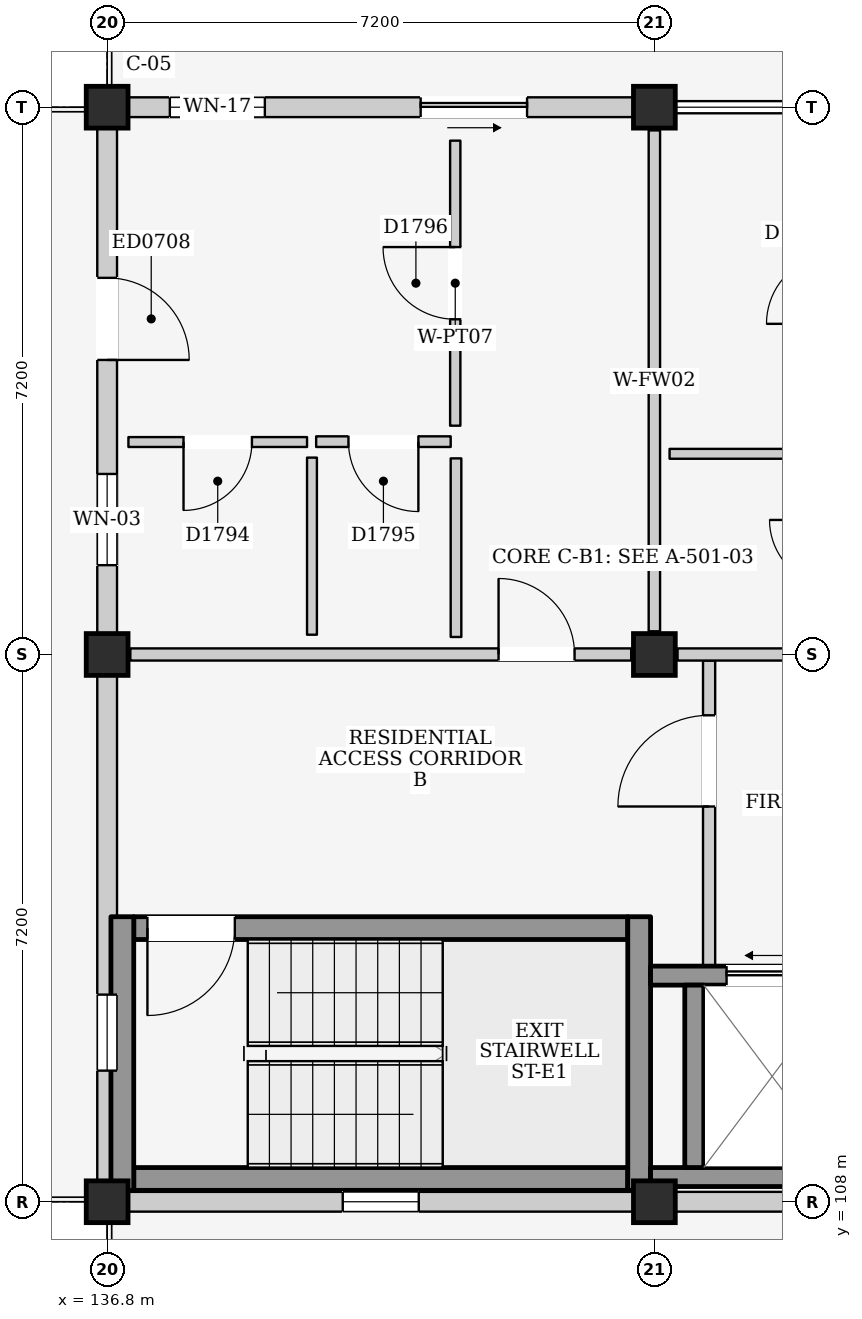
"""IFC4 building model, lengths in metres.
Left out: names, types, materials, properties, quantities, classifications, styles, units other than length and angle.
Written with IfcOpenShell. Run it as: python <this file> out.ifc"""

import sys

from ifc_helpers import new_model, si_unit, direction, frame, frame_2d, origin, origin_2d, place, context, subcontext, project, spatial, rectangle, extrude, element, fill, save


model = new_model("IFC4")
c1 = context("Model", 3, precision=1e-05, world=origin(), true_north=direction((0.0, 1.0)))
c2 = subcontext(c1, "Body", "Model", "MODEL_VIEW")
j1 = project(units=[si_unit("LENGTHUNIT", "METRE"), si_unit("PLANEANGLEUNIT", "RADIAN")], contexts=[c1])
p1 = place(None, origin())
s1 = spatial("IfcSite", under=j1, at=p1, CompositionType="ELEMENT")
p2 = place(p1, origin())
s2 = spatial("IfcBuilding", under=s1, at=p2, CompositionType="ELEMENT")
p3 = place(p2, frame((0.0, 0.0, 31.5)))
s3 = spatial("IfcBuildingStorey", under=s2, at=p3, CompositionType="ELEMENT", Elevation=31.5)
for number, where, z_axis, x_axis in (
    (1, (136.8, 108.0, 0.0), (0.0, 0.0, 1.0), (1.0, 0.0, 0.0)),
    (2, (136.8, 115.2, 0.0), (0.0, 0.0, 1.0), (1.0, 0.0, 0.0)),
    (3, (136.8, 122.4, 0.0), (0.0, 0.0, 1.0), (1.0, 0.0, 0.0)),
    (4, (144.0, 108.0, 0.0), (0.0, 0.0, 1.0), (1.0, 0.0, 0.0)),
    (5, (144.0, 115.2, 0.0), (0.0, 0.0, 1.0), (1.0, 0.0, 0.0)),
    (6, (144.0, 122.4, 0.0), (0.0, 0.0, 1.0), (1.0, 0.0, 0.0)),
):
    element("IfcColumn", number, at=place(p3, frame(where, z_axis=z_axis, x_axis=x_axis)), inside=s3, PredefinedType="COLUMN", context=c2, shape_type="SweptSolid", body=[
        extrude(rectangle(XDim=0.55, YDim=0.55, at=origin_2d()), origin(), (0.0, 0.0, 1.0), 3.3),
    ])
p4 = place(p3, frame((137.075, 108.0, 0.0), z_axis=(0.0, 0.0, 1.0), x_axis=(1.0, 0.0, 0.0)))
e7 = element("IfcWall", 7, at=p4, inside=s3, PredefinedType="ELEMENTEDWALL", context=c2, shape_type="SweptSolid", body=[
    extrude(rectangle(XDim=6.65, YDim=0.26, at=frame_2d((3.325, 0.0))), origin(), (0.0, 0.0, 1.0), 2.465),
])
p5 = place(p4, frame((2.825, 0.0, 1.2)))
e8 = element("IfcOpeningElement", 8, at=p5, cuts=e7, PredefinedType="OPENING", context=c2, shape_type="SweptSolid", body=[
    extrude(rectangle(XDim=1.0, YDim=0.9, at=frame_2d((0.5, 0.45))), frame((0.0, 0.145, 0.0), z_axis=(0.0, -1.0, 0.0), x_axis=(1.0, 0.0, 0.0)), (0.0, 0.0, 1.0), 0.29),
])
p6 = place(p3, frame((136.8, 108.275, 0.0), z_axis=(0.0, 0.0, 1.0), x_axis=(0.0, 1.0, 0.0)))
e9 = element("IfcWall", 9, at=p6, inside=s3, PredefinedType="ELEMENTEDWALL", context=c2, shape_type="SweptSolid", body=[
    extrude(rectangle(XDim=6.65, YDim=0.26, at=frame_2d((3.325, 0.0))), origin(), (0.0, 0.0, 1.0), 2.565),
])
p7 = place(p6, frame((1.45, 0.0, 1.2)))
e10 = element("IfcOpeningElement", 10, at=p7, cuts=e9, PredefinedType="OPENING", context=c2, shape_type="SweptSolid", body=[
    extrude(rectangle(XDim=1.0, YDim=0.9, at=frame_2d((0.5, 0.45))), frame((0.0, 0.145, 0.0), z_axis=(0.0, -1.0, 0.0), x_axis=(1.0, 0.0, 0.0)), (0.0, 0.0, 1.0), 0.29),
])
p8 = place(p3, frame((137.075, 122.4, 0.0), z_axis=(0.0, 0.0, 1.0), x_axis=(1.0, 0.0, 0.0)))
e11 = element("IfcWall", 11, at=p8, inside=s3, PredefinedType="ELEMENTEDWALL", context=c2, shape_type="SweptSolid", body=[
    extrude(rectangle(XDim=6.65, YDim=0.26, at=frame_2d((3.325, 0.0))), origin(), (0.0, 0.0, 1.0), 2.615),
])
p9 = place(p8, frame((3.85, 0.0, 0.0)))
e12 = element("IfcOpeningElement", 12, at=p9, cuts=e11, PredefinedType="OPENING", context=c2, shape_type="SweptSolid", body=[
    extrude(rectangle(XDim=1.4, YDim=2.1, at=frame_2d((0.7, 1.05))), frame((0.0, 0.145, 0.0), z_axis=(0.0, -1.0, 0.0), x_axis=(1.0, 0.0, 0.0)), (0.0, 0.0, 1.0), 0.29),
])
p10 = place(p8, frame((0.55, 0.0, 0.9)))
e13 = element("IfcOpeningElement", 13, at=p10, cuts=e11, PredefinedType="OPENING", context=c2, shape_type="SweptSolid", body=[
    extrude(rectangle(XDim=1.25, YDim=1.3, at=frame_2d((0.625, 0.65))), frame((0.0, 0.145, 0.0), z_axis=(0.0, -1.0, 0.0), x_axis=(1.0, 0.0, 0.0)), (0.0, 0.0, 1.0), 0.29),
])
p11 = place(p3, frame((136.8, 115.475, 0.0), z_axis=(0.0, 0.0, 1.0), x_axis=(0.0, 1.0, 0.0)))
e14 = element("IfcWall", 14, at=p11, inside=s3, PredefinedType="ELEMENTEDWALL", context=c2, shape_type="SweptSolid", body=[
    extrude(rectangle(XDim=6.65, YDim=0.26, at=frame_2d((3.325, 0.0))), origin(), (0.0, 0.0, 1.0), 2.565),
])
p12 = place(p11, frame((3.6, 0.0, 0.0)))
e15 = element("IfcOpeningElement", 15, at=p12, cuts=e14, PredefinedType="OPENING", context=c2, shape_type="SweptSolid", body=[
    extrude(rectangle(XDim=1.08, YDim=2.12, at=frame_2d((0.54, 1.06))), frame((0.0, 0.145, 0.0), z_axis=(0.0, -1.0, 0.0), x_axis=(1.0, 0.0, 0.0)), (0.0, 0.0, 1.0), 0.29),
])
p13 = place(p11, frame((0.9, 0.0, 0.95)))
e16 = element("IfcOpeningElement", 16, at=p13, cuts=e14, PredefinedType="OPENING", context=c2, shape_type="SweptSolid", body=[
    extrude(rectangle(XDim=1.2, YDim=1.35, at=frame_2d((0.6, 0.675))), frame((0.0, 0.145, 0.0), z_axis=(0.0, -1.0, 0.0), x_axis=(1.0, 0.0, 0.0)), (0.0, 0.0, 1.0), 0.29),
])
p14 = place(p3, frame((144.275, 108.0, 0.0), z_axis=(0.0, 0.0, 1.0), x_axis=(1.0, 0.0, 0.0)))
e17 = element("IfcWall", 17, at=p14, inside=s3, PredefinedType="ELEMENTEDWALL", context=c2, shape_type="SweptSolid", body=[
    extrude(rectangle(XDim=6.65, YDim=0.26, at=frame_2d((3.325, 0.0))), origin(), (0.0, 0.0, 1.0), 2.465),
])
p15 = place(p14, frame((2.825, 0.0, 1.2)))
e18 = element("IfcOpeningElement", 18, at=p15, cuts=e17, PredefinedType="OPENING", context=c2, shape_type="SweptSolid", body=[
    extrude(rectangle(XDim=1.0, YDim=0.9, at=frame_2d((0.5, 0.45))), frame((0.0, 0.145, 0.0), z_axis=(0.0, -1.0, 0.0), x_axis=(1.0, 0.0, 0.0)), (0.0, 0.0, 1.0), 0.29),
])
p16 = place(p3, frame((137.15, 108.3, 0.0), z_axis=(0.0, 0.0, 1.0), x_axis=(1.0, 0.0, 0.0)))
e19 = element("IfcWall", 19, at=p16, inside=s3, PredefinedType="SHEAR", context=c2, shape_type="SweptSolid", body=[
    extrude(rectangle(XDim=6.5, YDim=0.3, at=frame_2d((3.25, 0.0))), origin(), (0.0, 0.0, 1.0), 3.08),
])
p17 = place(p3, frame((137.15, 111.6, 0.0), z_axis=(0.0, 0.0, 1.0), x_axis=(1.0, 0.0, 0.0)))
e20 = element("IfcWall", 20, at=p17, inside=s3, PredefinedType="SHEAR", context=c2, shape_type="SweptSolid", body=[
    extrude(rectangle(XDim=6.5, YDim=0.3, at=frame_2d((3.25, 0.0))), origin(), (0.0, 0.0, 1.0), 3.08),
])
p18 = place(p17, frame((0.18, 0.0, 0.0)))
e21 = element("IfcOpeningElement", 21, at=p18, cuts=e20, PredefinedType="OPENING", context=c2, shape_type="SweptSolid", body=[
    extrude(rectangle(XDim=1.15, YDim=2.2, at=frame_2d((0.575, 1.1))), frame((0.0, 0.165, 0.0), z_axis=(0.0, -1.0, 0.0), x_axis=(1.0, 0.0, 0.0)), (0.0, 0.0, 1.0), 0.33),
])
for number, where, z_axis, x_axis in (
    (22, (137.0, 108.15, 0.0), (0.0, 0.0, 1.0), (0.0, 1.0, 0.0)),
    (23, (143.8, 108.15, 0.0), (0.0, 0.0, 1.0), (0.0, 1.0, 0.0)),
):
    element("IfcWall", number, at=place(p3, frame(where, z_axis=z_axis, x_axis=x_axis)), inside=s3, PredefinedType="SHEAR", context=c2, shape_type="SweptSolid", body=[
        extrude(rectangle(XDim=3.6, YDim=0.3, at=frame_2d((1.8, 0.0))), origin(), (0.0, 0.0, 1.0), 3.08),
    ])
p19 = place(p3, frame((144.72, 111.1, 0.0), z_axis=(0.0, 0.0, 1.0), x_axis=(0.0, 1.0, 0.0)))
e24 = element("IfcWall", 24, at=p19, inside=s3, PredefinedType="PARTITIONING", context=c2, shape_type="SweptSolid", body=[
    extrude(rectangle(XDim=4.02, YDim=0.16, at=frame_2d((2.01, 0.0))), origin(), (0.0, 0.0, 1.0), 3.08),
])
p20 = place(p19, frame((2.1, 0.0, 0.0)))
e25 = element("IfcOpeningElement", 25, at=p20, cuts=e24, PredefinedType="OPENING", context=c2, shape_type="SweptSolid", body=[
    extrude(rectangle(XDim=1.2, YDim=2.2, at=frame_2d((0.6, 1.1))), frame((0.0, 0.095, 0.0), z_axis=(0.0, -1.0, 0.0), x_axis=(1.0, 0.0, 0.0)), (0.0, 0.0, 1.0), 0.19),
])
p21 = place(p3, frame((143.95, 108.325, 0.0), z_axis=(0.0, 0.0, 1.0), x_axis=(1.0, 0.0, 0.0)))
e26 = element("IfcWall", 26, at=p21, inside=s3, PredefinedType="SHEAR", context=c2, shape_type="SweptSolid", body=[
    extrude(rectangle(XDim=2.675, YDim=0.25, at=frame_2d((1.337, 0.0))), origin(), (0.0, 0.0, 1.0), 3.08),
])
p22 = place(p3, frame((143.95, 110.975, 0.0), z_axis=(0.0, 0.0, 1.0), x_axis=(1.0, 0.0, 0.0)))
e27 = element("IfcWall", 27, at=p22, inside=s3, PredefinedType="SHEAR", context=c2, shape_type="SweptSolid", body=[
    extrude(rectangle(XDim=2.675, YDim=0.25, at=frame_2d((1.337, 0.0))), origin(), (0.0, 0.0, 1.0), 3.08),
])
p23 = place(p22, frame((1.0, 0.0, 0.0)))
e28 = element("IfcOpeningElement", 28, at=p23, cuts=e27, PredefinedType="OPENING", context=c2, shape_type="SweptSolid", body=[
    extrude(rectangle(XDim=1.2, YDim=2.25, at=frame_2d((0.6, 1.125))), frame((0.0, 0.14, 0.0), z_axis=(0.0, -1.0, 0.0), x_axis=(1.0, 0.0, 0.0)), (0.0, 0.0, 1.0), 0.28),
])
p24 = place(p3, frame((144.525, 108.45, 0.0), z_axis=(0.0, 0.0, 1.0), x_axis=(0.0, 1.0, 0.0)))
e29 = element("IfcWall", 29, at=p24, inside=s3, PredefinedType="SHEAR", context=c2, shape_type="SweptSolid", body=[
    extrude(rectangle(XDim=2.4, YDim=0.25, at=frame_2d((1.2, 0.0))), origin(), (0.0, 0.0, 1.0), 3.08),
])
p25 = place(p3, frame((137.105, 115.2, 0.0), z_axis=(0.0, 0.0, 1.0), x_axis=(1.0, 0.0, 0.0)))
e30 = element("IfcWall", 30, at=p25, inside=s3, PredefinedType="PARTITIONING", context=c2, shape_type="SweptSolid", body=[
    extrude(rectangle(XDim=6.59, YDim=0.16, at=frame_2d((3.295, 0.0))), origin(), (0.0, 0.0, 1.0), 2.465),
])
p26 = place(p25, frame((4.845, 0.0, 0.0)))
e31 = element("IfcOpeningElement", 31, at=p26, cuts=e30, PredefinedType="OPENING", context=c2, shape_type="SweptSolid", body=[
    extrude(rectangle(XDim=1.0, YDim=2.15, at=frame_2d((0.5, 1.075))), frame((0.0, 0.095, 0.0), z_axis=(0.0, -1.0, 0.0), x_axis=(1.0, 0.0, 0.0)), (0.0, 0.0, 1.0), 0.19),
])
p27 = place(p3, frame((144.0, 115.505, 0.0), z_axis=(0.0, 0.0, 1.0), x_axis=(0.0, 1.0, 0.0)))
e32 = element("IfcWall", 32, at=p27, inside=s3, PredefinedType="PARTITIONING", context=c2, shape_type="SweptSolid", body=[
    extrude(rectangle(XDim=6.59, YDim=0.15, at=frame_2d((3.295, 0.0))), origin(), (0.0, 0.0, 1.0), 2.565),
])
p28 = place(p3, frame((137.08, 117.995, 0.0), z_axis=(0.0, 0.0, 1.0), x_axis=(1.0, 0.0, 0.0)))
e33 = element("IfcWall", 33, at=p28, inside=s3, PredefinedType="PARTITIONING", context=c2, shape_type="SweptSolid", body=[
    extrude(rectangle(XDim=2.35, YDim=0.13, at=frame_2d((1.175, 0.0))), origin(), (0.0, 0.0, 1.0), 3.08),
])
p29 = place(p28, frame((0.725, 0.0, 0.0)))
e34 = element("IfcOpeningElement", 34, at=p29, cuts=e33, PredefinedType="OPENING", context=c2, shape_type="SweptSolid", body=[
    extrude(rectangle(XDim=0.9, YDim=2.1, at=frame_2d((0.45, 1.05))), frame((0.0, 0.08, 0.0), z_axis=(0.0, -1.0, 0.0), x_axis=(1.0, 0.0, 0.0)), (0.0, 0.0, 1.0), 0.16),
])
p30 = place(p3, frame((139.495, 115.46, 0.0), z_axis=(0.0, 0.0, 1.0), x_axis=(0.0, 1.0, 0.0)))
e35 = element("IfcWall", 35, at=p30, inside=s3, PredefinedType="PARTITIONING", context=c2, shape_type="SweptSolid", body=[
    extrude(rectangle(XDim=2.33, YDim=0.13, at=frame_2d((1.165, 0.0))), origin(), (0.0, 0.0, 1.0), 3.08),
])
p31 = place(p3, frame((139.55, 118.0, 0.0), z_axis=(0.0, 0.0, 1.0), x_axis=(1.0, 0.0, 0.0)))
e36 = element("IfcWall", 36, at=p31, inside=s3, PredefinedType="PARTITIONING", context=c2, shape_type="SweptSolid", body=[
    extrude(rectangle(XDim=1.77, YDim=0.14, at=frame_2d((0.885, 0.0))), origin(), (0.0, 0.0, 1.0), 3.08),
])
p32 = place(p31, frame((0.425, 0.0, 0.0)))
e37 = element("IfcOpeningElement", 37, at=p32, cuts=e36, PredefinedType="OPENING", context=c2, shape_type="SweptSolid", body=[
    extrude(rectangle(XDim=0.92, YDim=2.1, at=frame_2d((0.46, 1.05))), frame((0.0, 0.085, 0.0), z_axis=(0.0, -1.0, 0.0), x_axis=(1.0, 0.0, 0.0)), (0.0, 0.0, 1.0), 0.17),
])
p33 = place(p3, frame((141.39, 115.43, 0.0), z_axis=(0.0, 0.0, 1.0), x_axis=(0.0, 1.0, 0.0)))
e38 = element("IfcWall", 38, at=p33, inside=s3, PredefinedType="PARTITIONING", context=c2, shape_type="SweptSolid", body=[
    extrude(rectangle(XDim=2.35, YDim=0.14, at=frame_2d((1.175, 0.0))), origin(), (0.0, 0.0, 1.0), 3.08),
])
p34 = place(p3, frame((141.38, 118.21, 0.0), z_axis=(0.0, 0.0, 1.0), x_axis=(0.0, 1.0, 0.0)))
e39 = element("IfcWall", 39, at=p34, inside=s3, PredefinedType="PARTITIONING", context=c2, shape_type="SweptSolid", body=[
    extrude(rectangle(XDim=3.75, YDim=0.135, at=frame_2d((1.875, 0.0))), origin(), (0.0, 0.0, 1.0), 3.08),
])
p35 = place(p34, frame((1.4, 0.0, 0.0)))
e40 = element("IfcOpeningElement", 40, at=p35, cuts=e39, PredefinedType="OPENING", context=c2, shape_type="SweptSolid", body=[
    extrude(rectangle(XDim=0.95, YDim=2.15, at=frame_2d((0.475, 1.075))), frame((0.0, 0.083, 0.0), z_axis=(0.0, -1.0, 0.0), x_axis=(1.0, 0.0, 0.0)), (0.0, 0.0, 1.0), 0.165),
])
p36 = place(p3, frame((144.305, 115.2, 0.0), z_axis=(0.0, 0.0, 1.0), x_axis=(1.0, 0.0, 0.0)))
e41 = element("IfcWall", 41, at=p36, inside=s3, PredefinedType="PARTITIONING", context=c2, shape_type="SweptSolid", body=[
    extrude(rectangle(XDim=6.59, YDim=0.16, at=frame_2d((3.295, 0.0))), origin(), (0.0, 0.0, 1.0), 2.465),
])
p37 = place(p36, frame((4.145, 0.0, 0.0)))
e42 = element("IfcOpeningElement", 42, at=p37, cuts=e41, PredefinedType="OPENING", context=c2, shape_type="SweptSolid", body=[
    extrude(rectangle(XDim=1.0, YDim=2.15, at=frame_2d((0.5, 1.075))), frame((0.0, 0.095, 0.0), z_axis=(0.0, -1.0, 0.0), x_axis=(1.0, 0.0, 0.0)), (0.0, 0.0, 1.0), 0.19),
])
p38 = place(p3, frame((144.2, 117.84, 0.0), z_axis=(0.0, 0.0, 1.0), x_axis=(1.0, 0.0, 0.0)))
e43 = element("IfcWall", 43, at=p38, inside=s3, PredefinedType="PARTITIONING", context=c2, shape_type="SweptSolid", body=[
    extrude(rectangle(XDim=2.05, YDim=0.13, at=frame_2d((1.025, 0.0))), origin(), (0.0, 0.0, 1.0), 3.08),
])
p39 = place(p5, origin())
e44 = element("IfcWindow", 44, at=p39, inside=s3, PartitioningType="SINGLE_PANEL", PredefinedType="WINDOW", context=c2, shape_type="SweptSolid", body=[
    extrude(rectangle(XDim=1.0, YDim=0.9, at=frame_2d((0.5, 0.45))), frame((0.0, 0.03, 0.0), z_axis=(0.0, -1.0, 0.0), x_axis=(1.0, 0.0, 0.0)), (0.0, 0.0, 1.0), 0.06),
])
fill(e8, e44)
p40 = place(p7, origin())
e45 = element("IfcWindow", 45, at=p40, inside=s3, PartitioningType="SINGLE_PANEL", PredefinedType="WINDOW", context=c2, shape_type="SweptSolid", body=[
    extrude(rectangle(XDim=1.0, YDim=0.9, at=frame_2d((0.5, 0.45))), frame((0.0, 0.03, 0.0), z_axis=(0.0, -1.0, 0.0), x_axis=(1.0, 0.0, 0.0)), (0.0, 0.0, 1.0), 0.06),
])
fill(e10, e45)
p41 = place(p9, frame((1.4, 0.0, 0.0), z_axis=(0.0, 0.0, 1.0), x_axis=(-1.0, 0.0, 0.0)))
e46 = element("IfcDoor", 46, at=p41, inside=s3, OperationType="SLIDING_TO_RIGHT", PredefinedType="DOOR", context=c2, shape_type="SweptSolid", body=[
    extrude(rectangle(XDim=1.4, YDim=2.1, at=frame_2d((0.7, 1.05))), frame((0.0, 0.025, 0.0), z_axis=(0.0, -1.0, 0.0), x_axis=(1.0, 0.0, 0.0)), (0.0, 0.0, 1.0), 0.05),
])
fill(e12, e46)
p42 = place(p10, origin())
e47 = element("IfcWindow", 47, at=p42, inside=s3, PartitioningType="SINGLE_PANEL", PredefinedType="WINDOW", context=c2, shape_type="SweptSolid", body=[
    extrude(rectangle(XDim=1.25, YDim=1.3, at=frame_2d((0.625, 0.65))), frame((0.0, 0.03, 0.0), z_axis=(0.0, -1.0, 0.0), x_axis=(1.0, 0.0, 0.0)), (0.0, 0.0, 1.0), 0.06),
])
fill(e13, e47)
p43 = place(p12, frame((1.08, 0.0, 0.0), z_axis=(0.0, 0.0, 1.0), x_axis=(-1.0, 0.0, 0.0)))
e48 = element("IfcDoor", 48, at=p43, inside=s3, OperationType="SINGLE_SWING_RIGHT", PredefinedType="DOOR", context=c2, shape_type="SweptSolid", body=[
    extrude(rectangle(XDim=1.08, YDim=2.12, at=frame_2d((0.54, 1.06))), frame((0.0, 0.025, 0.0), z_axis=(0.0, -1.0, 0.0), x_axis=(1.0, 0.0, 0.0)), (0.0, 0.0, 1.0), 0.05),
])
fill(e15, e48)
p44 = place(p13, origin())
e49 = element("IfcWindow", 49, at=p44, inside=s3, PartitioningType="SINGLE_PANEL", PredefinedType="WINDOW", context=c2, shape_type="SweptSolid", body=[
    extrude(rectangle(XDim=1.2, YDim=1.35, at=frame_2d((0.6, 0.675))), frame((0.0, 0.03, 0.0), z_axis=(0.0, -1.0, 0.0), x_axis=(1.0, 0.0, 0.0)), (0.0, 0.0, 1.0), 0.06),
])
fill(e16, e49)
p45 = place(p18, frame((1.15, 0.0, 0.0), z_axis=(0.0, 0.0, 1.0), x_axis=(-1.0, 0.0, 0.0)))
e50 = element("IfcDoor", 50, at=p45, inside=s3, OperationType="SINGLE_SWING_RIGHT", PredefinedType="DOOR", context=c2, shape_type="SweptSolid", body=[
    extrude(rectangle(XDim=1.15, YDim=2.2, at=frame_2d((0.575, 1.1))), frame((0.0, 0.025, 0.0), z_axis=(0.0, -1.0, 0.0), x_axis=(1.0, 0.0, 0.0)), (0.0, 0.0, 1.0), 0.05),
])
fill(e21, e50)
p46 = place(p20, origin())
e51 = element("IfcDoor", 51, at=p46, inside=s3, OperationType="SINGLE_SWING_LEFT", PredefinedType="DOOR", context=c2, shape_type="SweptSolid", body=[
    extrude(rectangle(XDim=1.2, YDim=2.2, at=frame_2d((0.6, 1.1))), frame((0.0, 0.025, 0.0), z_axis=(0.0, -1.0, 0.0), x_axis=(1.0, 0.0, 0.0)), (0.0, 0.0, 1.0), 0.05),
])
fill(e25, e51)
p47 = place(p23, origin())
e52 = element("IfcDoor", 52, at=p47, inside=s3, OperationType="SLIDING_TO_LEFT", PredefinedType="DOOR", context=c2, shape_type="SweptSolid", body=[
    extrude(rectangle(XDim=1.2, YDim=2.25, at=frame_2d((0.6, 1.125))), frame((0.0, 0.025, 0.0), z_axis=(0.0, -1.0, 0.0), x_axis=(1.0, 0.0, 0.0)), (0.0, 0.0, 1.0), 0.05),
])
fill(e28, e52)
p48 = place(p26, origin())
e53 = element("IfcDoor", 53, at=p48, inside=s3, OperationType="SINGLE_SWING_LEFT", PredefinedType="DOOR", context=c2, shape_type="SweptSolid", body=[
    extrude(rectangle(XDim=1.0, YDim=2.15, at=frame_2d((0.5, 1.075))), frame((0.0, 0.025, 0.0), z_axis=(0.0, -1.0, 0.0), x_axis=(1.0, 0.0, 0.0)), (0.0, 0.0, 1.0), 0.05),
])
fill(e31, e53)
p49 = place(p29, frame((0.9, 0.0, 0.0), z_axis=(0.0, 0.0, 1.0), x_axis=(-1.0, 0.0, 0.0)))
e54 = element("IfcDoor", 54, at=p49, inside=s3, OperationType="SINGLE_SWING_RIGHT", PredefinedType="DOOR", context=c2, shape_type="SweptSolid", body=[
    extrude(rectangle(XDim=0.9, YDim=2.1, at=frame_2d((0.45, 1.05))), frame((0.0, 0.025, 0.0), z_axis=(0.0, -1.0, 0.0), x_axis=(1.0, 0.0, 0.0)), (0.0, 0.0, 1.0), 0.05),
])
fill(e34, e54)
p50 = place(p32, frame((0.92, 0.0, 0.0), z_axis=(0.0, 0.0, 1.0), x_axis=(-1.0, 0.0, 0.0)))
e55 = element("IfcDoor", 55, at=p50, inside=s3, OperationType="SINGLE_SWING_LEFT", PredefinedType="DOOR", context=c2, shape_type="SweptSolid", body=[
    extrude(rectangle(XDim=0.92, YDim=2.1, at=frame_2d((0.46, 1.05))), frame((0.0, 0.025, 0.0), z_axis=(0.0, -1.0, 0.0), x_axis=(1.0, 0.0, 0.0)), (0.0, 0.0, 1.0), 0.05),
])
fill(e37, e55)
p51 = place(p35, origin())
e56 = element("IfcDoor", 56, at=p51, inside=s3, OperationType="SINGLE_SWING_RIGHT", PredefinedType="DOOR", context=c2, shape_type="SweptSolid", body=[
    extrude(rectangle(XDim=0.95, YDim=2.15, at=frame_2d((0.475, 1.075))), frame((0.0, 0.025, 0.0), z_axis=(0.0, -1.0, 0.0), x_axis=(1.0, 0.0, 0.0)), (0.0, 0.0, 1.0), 0.05),
])
fill(e40, e56)
save(model, sys.argv[1])
